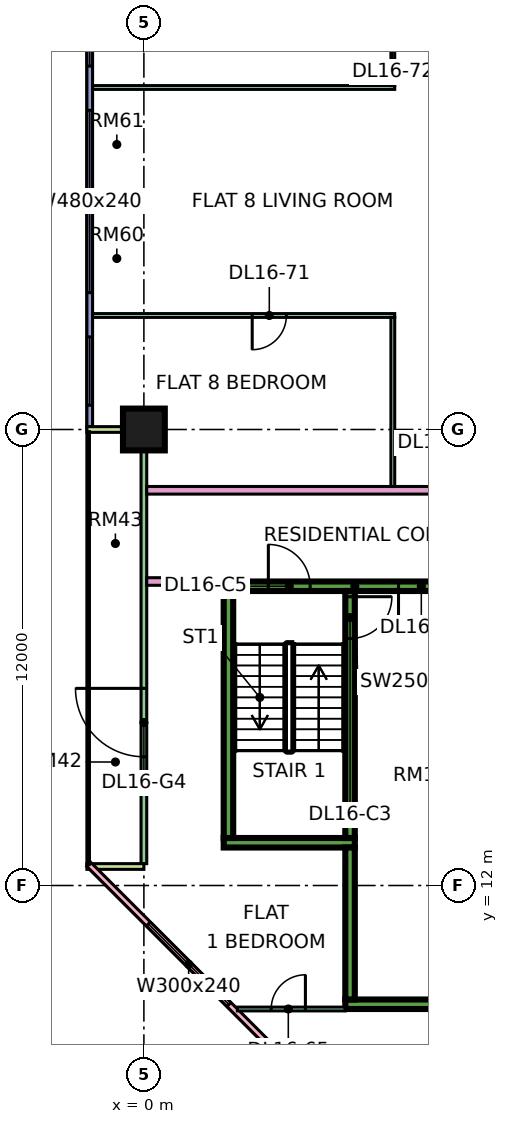
"""IFC4 building model, lengths in metres.
Left out: names, types, materials, properties, quantities, classifications, styles, units other than length and angle.
Written with IfcOpenShell. Run it as: python <this file> out.ifc"""

import sys

from ifc_helpers import new_model, si_unit, direction, frame, frame_2d, origin, origin_2d, place, context, subcontext, project, spatial, rectangle, extrude, element, fill, save


model = new_model("IFC4")
c1 = context("Model", 3, precision=1e-05, world=origin(), true_north=direction((0.0, 1.0)))
c2 = subcontext(c1, "Body", "Model", "MODEL_VIEW")
j1 = project(units=[si_unit("LENGTHUNIT", "METRE"), si_unit("PLANEANGLEUNIT", "RADIAN")], contexts=[c1])
p1 = place(None, origin())
s1 = spatial("IfcSite", under=j1, at=p1, CompositionType="ELEMENT")
p2 = place(p1, origin())
s2 = spatial("IfcBuilding", under=s1, at=p2, CompositionType="ELEMENT")
p3 = place(p2, frame((0.0, 0.0, 75.15)))
s3 = spatial("IfcBuildingStorey", under=s2, at=p3, CompositionType="ELEMENT", Elevation=75.15)
p4 = place(p3, frame((0.0, 24.0, 0.0), z_axis=(0.0, 0.0, 1.0), x_axis=(1.0, 0.0, 0.0)))
e1 = element("IfcColumn", 1, at=p4, inside=s3, PredefinedType="COLUMN", context=c2, shape_type="SweptSolid", body=[
    extrude(rectangle(XDim=1.1, YDim=1.1, at=origin_2d()), origin(), (0.0, 0.0, 1.0), 3.75),
])
p5 = place(p3, frame((2.1, 19.875, 0.0), z_axis=(0.0, 0.0, 1.0), x_axis=(1.0, 0.0, 0.0)))
e2 = element("IfcWall", 2, at=p5, inside=s3, PredefinedType="SHEAR", context=c2, shape_type="SweptSolid", body=[
    extrude(rectangle(XDim=6.9, YDim=0.25, at=frame_2d((3.45, 0.0))), origin(), (0.0, 0.0, 1.0), 3.75),
])
p6 = place(p5, frame((1.175, 0.0, 0.0)))
e3 = element("IfcOpeningElement", 3, at=p6, cuts=e2, PredefinedType="OPENING", context=c2, shape_type="SweptSolid", body=[
    extrude(rectangle(XDim=1.1, YDim=2.2, at=frame_2d((0.55, 1.1))), frame((0.0, 0.135, 0.0), z_axis=(0.0, -1.0, 0.0), x_axis=(1.0, 0.0, 0.0)), (0.0, 0.0, 1.0), 0.27),
])
p7 = place(p5, frame((4.6, 0.0, 0.0)))
e4 = element("IfcOpeningElement", 4, at=p7, cuts=e2, PredefinedType="OPENING", context=c2, shape_type="SweptSolid", body=[
    extrude(rectangle(XDim=1.2, YDim=2.2, at=frame_2d((0.6, 1.1))), frame((0.0, 0.135, 0.0), z_axis=(0.0, -1.0, 0.0), x_axis=(1.0, 0.0, 0.0)), (0.0, 0.0, 1.0), 0.27),
])
p8 = place(p3, frame((2.1, 13.125, 0.0), z_axis=(0.0, 0.0, 1.0), x_axis=(1.0, 0.0, 0.0)))
e5 = element("IfcWall", 5, at=p8, inside=s3, PredefinedType="SHEAR", context=c2, shape_type="SweptSolid", body=[
    extrude(rectangle(XDim=3.45, YDim=0.25, at=frame_2d((1.725, 0.0))), origin(), (0.0, 0.0, 1.0), 3.75),
])
p9 = place(p3, frame((2.225, 13.25, 0.0), z_axis=(0.0, 0.0, 1.0), x_axis=(0.0, 1.0, 0.0)))
e6 = element("IfcWall", 6, at=p9, inside=s3, PredefinedType="SHEAR", context=c2, shape_type="SweptSolid", body=[
    extrude(rectangle(XDim=6.5, YDim=0.25, at=frame_2d((3.25, 0.0))), origin(), (0.0, 0.0, 1.0), 3.75),
])
p10 = place(p3, frame((5.425, 13.25, 0.0), z_axis=(0.0, 0.0, 1.0), x_axis=(0.0, 1.0, 0.0)))
e7 = element("IfcWall", 7, at=p10, inside=s3, PredefinedType="SHEAR", context=c2, shape_type="SweptSolid", body=[
    extrude(rectangle(XDim=6.5, YDim=0.25, at=frame_2d((3.25, 0.0))), origin(), (0.0, 0.0, 1.0), 3.75),
])
p11 = place(p10, frame((5.25, 0.0, 0.0)))
e8 = element("IfcOpeningElement", 8, at=p11, cuts=e7, PredefinedType="OPENING", context=c2, shape_type="SweptSolid", body=[
    extrude(rectangle(XDim=1.1, YDim=2.2, at=frame_2d((0.55, 1.1))), frame((0.0, 0.135, 0.0), z_axis=(0.0, -1.0, 0.0), x_axis=(1.0, 0.0, 0.0)), (0.0, 0.0, 1.0), 0.27),
])
p12 = place(p3, frame((5.3, 8.875, 0.0), z_axis=(0.0, 0.0, 1.0), x_axis=(1.0, 0.0, 0.0)))
e9 = element("IfcWall", 9, at=p12, inside=s3, PredefinedType="SHEAR", context=c2, shape_type="SweptSolid", body=[
    extrude(rectangle(XDim=3.7, YDim=0.25, at=frame_2d((1.85, 0.0))), origin(), (0.0, 0.0, 1.0), 3.75),
])
p13 = place(p3, frame((5.425, 9.0, 0.0), z_axis=(0.0, 0.0, 1.0), x_axis=(0.0, 1.0, 0.0)))
e10 = element("IfcWall", 10, at=p13, inside=s3, PredefinedType="SHEAR", context=c2, shape_type="SweptSolid", body=[
    extrude(rectangle(XDim=4.0, YDim=0.25, at=frame_2d((2.0, 0.0))), origin(), (0.0, 0.0, 1.0), 3.75),
])
p14 = place(p3, frame((-1.425, 35.925, 0.0), z_axis=(0.0, 0.0, 1.0), x_axis=(0.0, -1.0, 0.0)))
e11 = element("IfcWall", 11, at=p14, inside=s3, PredefinedType="SOLIDWALL", context=c2, shape_type="SweptSolid", body=[
    extrude(rectangle(XDim=11.85, YDim=0.15, at=frame_2d((5.925, 0.0))), origin(), (0.0, 0.0, 1.0), 3.35),
])
p15 = place(p14, frame((0.562, 0.0, 0.45)))
e12 = element("IfcOpeningElement", 12, at=p15, cuts=e11, PredefinedType="OPENING", context=c2, shape_type="SweptSolid", body=[
    extrude(rectangle(XDim=1.8, YDim=2.4, at=frame_2d((0.9, 1.2))), frame((0.0, 0.085, 0.0), z_axis=(0.0, -1.0, 0.0), x_axis=(1.0, 0.0, 0.0)), (0.0, 0.0, 1.0), 0.17),
])
p16 = place(p14, frame((3.525, 0.0, 0.45)))
e13 = element("IfcOpeningElement", 13, at=p16, cuts=e11, PredefinedType="OPENING", context=c2, shape_type="SweptSolid", body=[
    extrude(rectangle(XDim=4.8, YDim=2.4, at=frame_2d((2.4, 1.2))), frame((0.0, 0.085, 0.0), z_axis=(0.0, -1.0, 0.0), x_axis=(1.0, 0.0, 0.0)), (0.0, 0.0, 1.0), 0.17),
])
p17 = place(p14, frame((9.488, 0.0, 0.45)))
e14 = element("IfcOpeningElement", 14, at=p17, cuts=e11, PredefinedType="OPENING", context=c2, shape_type="SweptSolid", body=[
    extrude(rectangle(XDim=1.8, YDim=2.4, at=frame_2d((0.9, 1.2))), frame((0.0, 0.085, 0.0), z_axis=(0.0, -1.0, 0.0), x_axis=(1.0, 0.0, 0.0)), (0.0, 0.0, 1.0), 0.17),
])
p18 = place(p3, frame((0.0, 23.925, 0.0), z_axis=(0.0, 0.0, 1.0), x_axis=(0.0, -1.0, 0.0)))
e15 = element("IfcWall", 15, at=p18, inside=s3, PredefinedType="SOLIDWALL", context=c2, shape_type="SweptSolid", body=[
    extrude(rectangle(XDim=11.35, YDim=0.15, at=frame_2d((5.675, 0.0))), origin(), (0.0, 0.0, 1.0), 3.35),
])
p19 = place(p18, frame((6.738, 0.0, 0.0)))
e16 = element("IfcOpeningElement", 16, at=p19, cuts=e15, PredefinedType="OPENING", context=c2, shape_type="SweptSolid", body=[
    extrude(rectangle(XDim=1.8, YDim=2.4, at=frame_2d((0.9, 1.2))), frame((0.0, 0.085, 0.0), z_axis=(0.0, -1.0, 0.0), x_axis=(1.0, 0.0, 0.0)), (0.0, 0.0, 1.0), 0.17),
])
for number, where, z_axis, x_axis in (
    (17, (-1.5, 24.0, 0.0), (0.0, 0.0, 1.0), (1.0, 0.0, 0.0)),
    (18, (-1.5, 12.5, 0.0), (0.0, 0.0, 1.0), (1.0, 0.0, 0.0)),
):
    element("IfcWall", number, at=place(p3, frame(where, z_axis=z_axis, x_axis=x_axis)), inside=s3, PredefinedType="SOLIDWALL", context=c2, shape_type="SweptSolid", body=[
        extrude(rectangle(XDim=1.5, YDim=0.15, at=frame_2d((0.75, 0.0))), origin(), (0.0, 0.0, 1.0), 3.35),
    ])
p20 = place(p3, frame((-1.447, 12.553, 0.0), z_axis=(0.0, 0.0, 1.0), x_axis=(0.707106781187, -0.707106781187, 0.0)))
e19 = element("IfcWall", 19, at=p20, inside=s3, PredefinedType="SOLIDWALL", context=c2, shape_type="SweptSolid", body=[
    extrude(rectangle(XDim=19.799, YDim=0.15, at=frame_2d((9.899, 0.0))), origin(), (0.0, 0.0, 1.0), 3.35),
])
p21 = place(p20, frame((2.212, 0.0, 0.45)))
e20 = element("IfcOpeningElement", 20, at=p21, cuts=e19, PredefinedType="OPENING", context=c2, shape_type="SweptSolid", body=[
    extrude(rectangle(XDim=3.0, YDim=2.4, at=frame_2d((1.5, 1.2))), frame((0.0, 0.085, 0.0), z_axis=(0.0, -1.0, 0.0), x_axis=(1.0, 0.0, 0.0)), (0.0, 0.0, 1.0), 0.17),
])
p22 = place(p20, frame((10.216, 0.0, 0.45)))
e21 = element("IfcOpeningElement", 21, at=p22, cuts=e19, PredefinedType="OPENING", context=c2, shape_type="SweptSolid", body=[
    extrude(rectangle(XDim=3.0, YDim=2.4, at=frame_2d((1.5, 1.2))), frame((0.0, 0.085, 0.0), z_axis=(0.0, -1.0, 0.0), x_axis=(1.0, 0.0, 0.0)), (0.0, 0.0, 1.0), 0.17),
])
p23 = place(p3, frame((-1.35, 27.0, 0.0), z_axis=(0.0, 0.0, 1.0), x_axis=(1.0, 0.0, 0.0)))
e22 = element("IfcWall", 22, at=p23, inside=s3, PredefinedType="PARTITIONING", context=c2, shape_type="SweptSolid", body=[
    extrude(rectangle(XDim=7.95, YDim=0.1, at=frame_2d((3.975, 0.0))), origin(), (0.0, 0.0, 1.0), 3.35),
])
p24 = place(p23, frame((4.2, 0.0, 0.0)))
e23 = element("IfcOpeningElement", 23, at=p24, cuts=e22, PredefinedType="OPENING", context=c2, shape_type="SweptSolid", body=[
    extrude(rectangle(XDim=0.9, YDim=2.1, at=frame_2d((0.45, 1.05))), frame((0.0, 0.06, 0.0), z_axis=(0.0, -1.0, 0.0), x_axis=(1.0, 0.0, 0.0)), (0.0, 0.0, 1.0), 0.12),
])
p25 = place(p3, frame((-1.35, 33.0, 0.0), z_axis=(0.0, 0.0, 1.0), x_axis=(1.0, 0.0, 0.0)))
e24 = element("IfcWall", 24, at=p25, inside=s3, PredefinedType="PARTITIONING", context=c2, shape_type="SweptSolid", body=[
    extrude(rectangle(XDim=7.95, YDim=0.1, at=frame_2d((3.975, 0.0))), origin(), (0.0, 0.0, 1.0), 3.35),
])
p26 = place(p3, frame((0.074, 20.0, 0.0), z_axis=(0.0, 0.0, 1.0), x_axis=(1.0, 0.0, 0.0)))
e25 = element("IfcWall", 25, at=p26, inside=s3, PredefinedType="PARTITIONING", context=c2, shape_type="SweptSolid", body=[
    extrude(rectangle(XDim=2.026, YDim=0.2, at=frame_2d((1.013, 0.0))), origin(), (0.0, 0.0, 1.0), 3.35),
])
p27 = place(p3, frame((0.074, 22.4, 0.0), z_axis=(0.0, 0.0, 1.0), x_axis=(1.0, 0.0, 0.0)))
e26 = element("IfcWall", 26, at=p27, inside=s3, PredefinedType="PARTITIONING", context=c2, shape_type="SweptSolid", body=[
    extrude(rectangle(XDim=12.376, YDim=0.2, at=frame_2d((6.188, 0.0))), origin(), (0.0, 0.0, 1.0), 3.35),
])
p28 = place(p3, frame((2.461, 8.75, 0.0), z_axis=(0.0, 0.0, 1.0), x_axis=(1.0, 0.0, 0.0)))
e27 = element("IfcWall", 27, at=p28, inside=s3, PredefinedType="PARTITIONING", context=c2, shape_type="SweptSolid", body=[
    extrude(rectangle(XDim=2.839, YDim=0.1, at=frame_2d((1.419, 0.0))), origin(), (0.0, 0.0, 1.0), 3.35),
])
p29 = place(p28, frame((0.889, 0.0, 0.0)))
e28 = element("IfcOpeningElement", 28, at=p29, cuts=e27, PredefinedType="OPENING", context=c2, shape_type="SweptSolid", body=[
    extrude(rectangle(XDim=0.9, YDim=2.1, at=frame_2d((0.45, 1.05))), frame((0.0, 0.06, 0.0), z_axis=(0.0, -1.0, 0.0), x_axis=(1.0, 0.0, 0.0)), (0.0, 0.0, 1.0), 0.12),
])
p30 = place(p3, frame((6.55, 22.5, 0.0), z_axis=(0.0, 0.0, 1.0), x_axis=(0.0, 1.0, 0.0)))
e29 = element("IfcWall", 29, at=p30, inside=s3, PredefinedType="PARTITIONING", context=c2, shape_type="SweptSolid", body=[
    extrude(rectangle(XDim=4.45, YDim=0.1, at=frame_2d((2.225, 0.0))), origin(), (0.0, 0.0, 1.0), 3.35),
])
p31 = place(p3, frame((6.55, 33.05, 0.0), z_axis=(0.0, 0.0, 1.0), x_axis=(0.0, 1.0, 0.0)))
e30 = element("IfcWall", 30, at=p31, inside=s3, PredefinedType="PARTITIONING", context=c2, shape_type="SweptSolid", body=[
    extrude(rectangle(XDim=2.85, YDim=0.1, at=frame_2d((1.425, 0.0))), origin(), (0.0, 0.0, 1.0), 3.35),
])
p32 = place(p31, frame((1.0, 0.0, 0.0)))
e31 = element("IfcOpeningElement", 31, at=p32, cuts=e30, PredefinedType="OPENING", context=c2, shape_type="SweptSolid", body=[
    extrude(rectangle(XDim=0.9, YDim=2.1, at=frame_2d((0.45, 1.05))), frame((0.0, 0.06, 0.0), z_axis=(0.0, -1.0, 0.0), x_axis=(1.0, 0.0, 0.0)), (0.0, 0.0, 1.0), 0.12),
])
p33 = place(p15, origin())
e32 = element("IfcWindow", 32, at=p33, inside=s3, PartitioningType="SINGLE_PANEL", PredefinedType="WINDOW", context=c2, shape_type="SweptSolid", body=[
    extrude(rectangle(XDim=1.8, YDim=2.4, at=frame_2d((0.9, 1.2))), frame((0.0, 0.03, 0.0), z_axis=(0.0, -1.0, 0.0), x_axis=(1.0, 0.0, 0.0)), (0.0, 0.0, 1.0), 0.06),
])
fill(e12, e32)
p34 = place(p16, origin())
e33 = element("IfcWindow", 33, at=p34, inside=s3, PartitioningType="SINGLE_PANEL", PredefinedType="WINDOW", context=c2, shape_type="SweptSolid", body=[
    extrude(rectangle(XDim=4.8, YDim=2.4, at=frame_2d((2.4, 1.2))), frame((0.0, 0.03, 0.0), z_axis=(0.0, -1.0, 0.0), x_axis=(1.0, 0.0, 0.0)), (0.0, 0.0, 1.0), 0.06),
])
fill(e13, e33)
p35 = place(p17, origin())
e34 = element("IfcWindow", 34, at=p35, inside=s3, PartitioningType="SINGLE_PANEL", PredefinedType="WINDOW", context=c2, shape_type="SweptSolid", body=[
    extrude(rectangle(XDim=1.8, YDim=2.4, at=frame_2d((0.9, 1.2))), frame((0.0, 0.03, 0.0), z_axis=(0.0, -1.0, 0.0), x_axis=(1.0, 0.0, 0.0)), (0.0, 0.0, 1.0), 0.06),
])
fill(e14, e34)
p36 = place(p19, frame((1.8, 0.0, 0.0), z_axis=(0.0, 0.0, 1.0), x_axis=(-1.0, 0.0, 0.0)))
e35 = element("IfcDoor", 35, at=p36, inside=s3, OperationType="DOUBLE_DOOR_SINGLE_SWING", PredefinedType="DOOR", context=c2, shape_type="SweptSolid", body=[
    extrude(rectangle(XDim=1.8, YDim=2.4, at=frame_2d((0.9, 1.2))), frame((0.0, 0.025, 0.0), z_axis=(0.0, -1.0, 0.0), x_axis=(1.0, 0.0, 0.0)), (0.0, 0.0, 1.0), 0.05),
])
fill(e16, e35)
p37 = place(p21, origin())
e36 = element("IfcWindow", 36, at=p37, inside=s3, PartitioningType="SINGLE_PANEL", PredefinedType="WINDOW", context=c2, shape_type="SweptSolid", body=[
    extrude(rectangle(XDim=3.0, YDim=2.4, at=frame_2d((1.5, 1.2))), frame((0.0, 0.03, 0.0), z_axis=(0.0, -1.0, 0.0), x_axis=(1.0, 0.0, 0.0)), (0.0, 0.0, 1.0), 0.06),
])
fill(e20, e36)
p38 = place(p11, origin())
e37 = element("IfcDoor", 37, at=p38, inside=s3, OperationType="SINGLE_SWING_RIGHT", PredefinedType="DOOR", context=c2, shape_type="SweptSolid", body=[
    extrude(rectangle(XDim=1.1, YDim=2.2, at=frame_2d((0.55, 1.1))), frame((0.0, 0.025, 0.0), z_axis=(0.0, -1.0, 0.0), x_axis=(1.0, 0.0, 0.0)), (0.0, 0.0, 1.0), 0.05),
])
fill(e8, e37)
p39 = place(p6, origin())
e38 = element("IfcDoor", 38, at=p39, inside=s3, OperationType="SINGLE_SWING_LEFT", PredefinedType="DOOR", context=c2, shape_type="SweptSolid", body=[
    extrude(rectangle(XDim=1.1, YDim=2.2, at=frame_2d((0.55, 1.1))), frame((0.0, 0.025, 0.0), z_axis=(0.0, -1.0, 0.0), x_axis=(1.0, 0.0, 0.0)), (0.0, 0.0, 1.0), 0.05),
])
fill(e3, e38)
p40 = place(p7, frame((1.2, 0.0, 0.0), z_axis=(0.0, 0.0, 1.0), x_axis=(-1.0, 0.0, 0.0)))
e39 = element("IfcDoor", 39, at=p40, inside=s3, OperationType="SINGLE_SWING_LEFT", PredefinedType="DOOR", context=c2, shape_type="SweptSolid", body=[
    extrude(rectangle(XDim=1.2, YDim=2.2, at=frame_2d((0.6, 1.1))), frame((0.0, 0.025, 0.0), z_axis=(0.0, -1.0, 0.0), x_axis=(1.0, 0.0, 0.0)), (0.0, 0.0, 1.0), 0.05),
])
fill(e4, e39)
p41 = place(p29, frame((0.9, 0.0, 0.0), z_axis=(0.0, 0.0, 1.0), x_axis=(-1.0, 0.0, 0.0)))
e40 = element("IfcDoor", 40, at=p41, inside=s3, OperationType="SINGLE_SWING_RIGHT", PredefinedType="DOOR", context=c2, shape_type="SweptSolid", body=[
    extrude(rectangle(XDim=0.9, YDim=2.1, at=frame_2d((0.45, 1.05))), frame((0.0, 0.025, 0.0), z_axis=(0.0, -1.0, 0.0), x_axis=(1.0, 0.0, 0.0)), (0.0, 0.0, 1.0), 0.05),
])
fill(e28, e40)
p42 = place(p24, frame((0.9, 0.0, 0.0), z_axis=(0.0, 0.0, 1.0), x_axis=(-1.0, 0.0, 0.0)))
e41 = element("IfcDoor", 41, at=p42, inside=s3, OperationType="SINGLE_SWING_LEFT", PredefinedType="DOOR", context=c2, shape_type="SweptSolid", body=[
    extrude(rectangle(XDim=0.9, YDim=2.1, at=frame_2d((0.45, 1.05))), frame((0.0, 0.025, 0.0), z_axis=(0.0, -1.0, 0.0), x_axis=(1.0, 0.0, 0.0)), (0.0, 0.0, 1.0), 0.05),
])
fill(e23, e41)
save(model, sys.argv[1])
